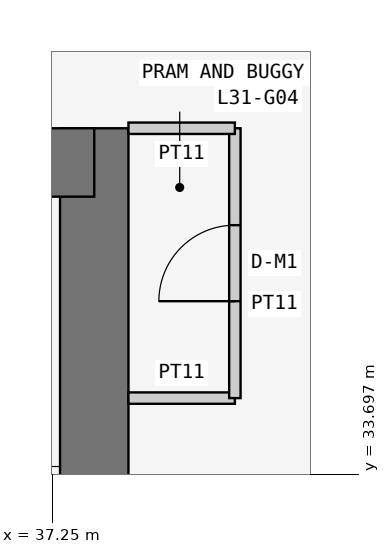
"""IFC4 building model, lengths in metres.
Left out: names, types, materials, properties, quantities, classifications, styles, units other than length and angle.
Written with IfcOpenShell. Run it as: python <this file> out.ifc"""

import sys

from ifc_helpers import new_model, si_unit, direction, frame, frame_2d, origin, place, context, subcontext, project, spatial, rectangle, extrude, element, fill, save


model = new_model("IFC4")
c1 = context("Model", 3, precision=1e-05, world=origin(), true_north=direction((0.0, 1.0)))
c2 = subcontext(c1, "Body", "Model", "MODEL_VIEW")
j1 = project(units=[si_unit("LENGTHUNIT", "METRE"), si_unit("PLANEANGLEUNIT", "RADIAN")], contexts=[c1])
p1 = place(None, origin())
s1 = spatial("IfcSite", under=j1, at=p1, CompositionType="ELEMENT")
p2 = place(p1, origin())
s2 = spatial("IfcBuilding", under=s1, at=p2, CompositionType="ELEMENT")
p3 = place(p2, frame((0.0, 0.0, 123.3)))
s3 = spatial("IfcBuildingStorey", under=s2, at=p3, CompositionType="ELEMENT", Elevation=123.3)
p4 = place(p3, frame((37.8, 21.0, 0.0), z_axis=(0.0, 0.0, 1.0), x_axis=(0.0, 1.0, 0.0)))
e1 = element("IfcWall", 1, at=p4, inside=s3, PredefinedType="SHEAR", context=c2, shape_type="SweptSolid", body=[
    extrude(rectangle(XDim=17.25, YDim=0.9, at=frame_2d((8.625, 0.0))), origin(), (0.0, 0.0, 1.0), 3.6),
])
p5 = place(p4, frame((5.2, 0.0, 0.0)))
e2 = element("IfcOpeningElement", 2, at=p5, cuts=e1, PredefinedType="OPENING", context=c2, shape_type="SweptSolid", body=[
    extrude(rectangle(XDim=1.2, YDim=2.1, at=frame_2d((0.6, 1.05))), frame((0.0, 0.46, 0.0), z_axis=(0.0, -1.0, 0.0), x_axis=(1.0, 0.0, 0.0)), (0.0, 0.0, 1.0), 0.92),
])
p6 = place(p3, frame((37.8, 37.8, 0.0), z_axis=(0.0, 0.0, 1.0), x_axis=(-1.0, 0.0, 0.0)))
e3 = element("IfcWall", 3, at=p6, inside=s3, PredefinedType="SHEAR", context=c2, shape_type="SweptSolid", body=[
    extrude(rectangle(XDim=17.25, YDim=0.9, at=frame_2d((8.625, 0.0))), origin(), (0.0, 0.0, 1.0), 3.6),
])
p7 = place(p3, frame((38.25, 34.7, 0.0), z_axis=(0.0, 0.0, 1.0), x_axis=(1.0, 0.0, 0.0)))
e4 = element("IfcWall", 4, at=p7, inside=s3, PredefinedType="PARTITIONING", context=c2, shape_type="SweptSolid", body=[
    extrude(rectangle(XDim=1.4, YDim=0.15, at=frame_2d((0.7, 0.0))), origin(), (0.0, 0.0, 1.0), 3.45),
])
p8 = place(p3, frame((39.65, 34.7, 0.0), z_axis=(0.0, 0.0, 1.0), x_axis=(0.0, 1.0, 0.0)))
e5 = element("IfcWall", 5, at=p8, inside=s3, PredefinedType="PARTITIONING", context=c2, shape_type="SweptSolid", body=[
    extrude(rectangle(XDim=3.55, YDim=0.15, at=frame_2d((1.775, 0.0))), origin(), (0.0, 0.0, 1.0), 3.45),
])
p9 = place(p8, frame((1.275, 0.0, 0.0)))
e6 = element("IfcOpeningElement", 6, at=p9, cuts=e5, PredefinedType="OPENING", context=c2, shape_type="SweptSolid", body=[
    extrude(rectangle(XDim=1.0, YDim=2.1, at=frame_2d((0.5, 1.05))), frame((0.0, 0.085, 0.0), z_axis=(0.0, -1.0, 0.0), x_axis=(1.0, 0.0, 0.0)), (0.0, 0.0, 1.0), 0.17),
])
p10 = place(p3, frame((39.65, 38.25, 0.0), z_axis=(0.0, 0.0, 1.0), x_axis=(-1.0, 0.0, 0.0)))
e7 = element("IfcWall", 7, at=p10, inside=s3, PredefinedType="PARTITIONING", context=c2, shape_type="SweptSolid", body=[
    extrude(rectangle(XDim=1.4, YDim=0.15, at=frame_2d((0.7, 0.0))), origin(), (0.0, 0.0, 1.0), 3.45),
])
p11 = place(p9, origin())
e8 = element("IfcDoor", 8, at=p11, inside=s3, OperationType="SINGLE_SWING_LEFT", PredefinedType="DOOR", context=c2, shape_type="SweptSolid", body=[
    extrude(rectangle(XDim=1.0, YDim=2.1, at=frame_2d((0.5, 1.05))), frame((0.0, 0.025, 0.0), z_axis=(0.0, -1.0, 0.0), x_axis=(1.0, 0.0, 0.0)), (0.0, 0.0, 1.0), 0.05),
])
fill(e6, e8)
save(model, sys.argv[1])
